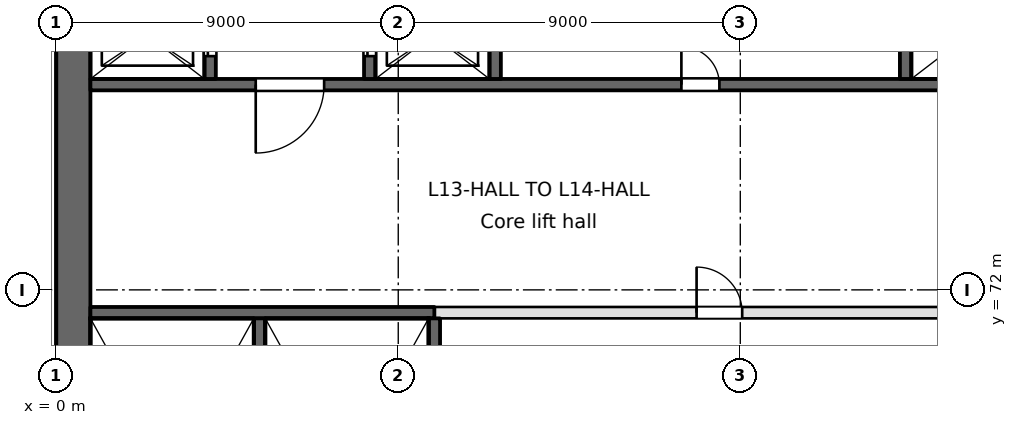
"""IFC4 building model, lengths in metres.
Left out: names, types, materials, properties, quantities, classifications, styles, units other than length and angle.
Written with IfcOpenShell. Run it as: python <this file> out.ifc"""

import sys

from ifc_helpers import new_model, si_unit, direction, frame, frame_2d, origin, place, context, subcontext, project, spatial, rectangle, extrude, element, fill, save


model = new_model("IFC4")
c1 = context("Model", 3, precision=1e-05, world=origin(), true_north=direction((0.0, 1.0)))
c2 = subcontext(c1, "Body", "Model", "MODEL_VIEW")
j1 = project(units=[si_unit("LENGTHUNIT", "METRE"), si_unit("PLANEANGLEUNIT", "RADIAN")], contexts=[c1])
p1 = place(None, origin())
s1 = spatial("IfcSite", under=j1, at=p1, CompositionType="ELEMENT")
p2 = place(p1, origin())
s2 = spatial("IfcBuilding", under=s1, at=p2, CompositionType="ELEMENT")
p3 = place(p2, frame((0.0, 0.0, 58.0)))
s3 = spatial("IfcBuildingStorey", under=s2, at=p3, CompositionType="ELEMENT", Elevation=58.0)
p4 = place(p3, frame((0.45, 94.5, 0.0), z_axis=(0.0, 0.0, 1.0), x_axis=(0.0, -1.0, 0.0)))
e1 = element("IfcWall", 1, at=p4, inside=s3, PredefinedType="SHEAR", context=c2, shape_type="SweptSolid", body=[
    extrude(rectangle(XDim=66.187, YDim=0.9, at=frame_2d((33.094, 0.0))), origin(), (0.0, 0.0, 1.0), 3.7),
])
p5 = place(p3, frame((0.9, 71.4, -0.4), z_axis=(0.0, 0.0, 1.0), x_axis=(1.0, 0.0, 0.0)))
e2 = element("IfcWall", 2, at=p5, inside=s3, PredefinedType="SOLIDWALL", context=c2, shape_type="SweptSolid", body=[
    extrude(rectangle(XDim=9.05, YDim=0.3, at=frame_2d((4.525, 0.0))), origin(), (0.0, 0.0, 1.0), 3.7),
])
p6 = place(p3, frame((9.95, 71.4, 0.0), z_axis=(0.0, 0.0, 1.0), x_axis=(1.0, 0.0, 0.0)))
e3 = element("IfcWall", 3, at=p6, inside=s3, PredefinedType="PARTITIONING", context=c2, shape_type="SweptSolid", body=[
    extrude(rectangle(XDim=17.65, YDim=0.3, at=frame_2d((8.825, 0.0))), origin(), (0.0, 0.0, 1.0), 3.3),
])
p7 = place(p6, frame((15.35, 0.0, 0.0)))
e4 = element("IfcOpeningElement", 4, at=p7, cuts=e3, PredefinedType="OPENING", context=c2, shape_type="SweptSolid", body=[
    extrude(rectangle(XDim=1.8, YDim=2.1, at=frame_2d((0.9, 1.05))), frame((0.0, 0.15, 0.0), z_axis=(0.0, -1.0, 0.0), x_axis=(1.0, 0.0, 0.0)), (0.0, 0.0, 1.0), 0.3),
])
p8 = place(p6, frame((6.9, 0.0, 0.0)))
e5 = element("IfcOpeningElement", 5, at=p8, cuts=e3, PredefinedType="OPENING", context=c2, shape_type="SweptSolid", body=[
    extrude(rectangle(XDim=1.2, YDim=2.1, at=frame_2d((0.6, 1.05))), frame((0.0, 0.15, 0.0), z_axis=(0.0, -1.0, 0.0), x_axis=(1.0, 0.0, 0.0)), (0.0, 0.0, 1.0), 0.3),
])
p9 = place(p3, frame((0.9, 77.4, -0.4), z_axis=(0.0, 0.0, 1.0), x_axis=(1.0, 0.0, 0.0)))
e6 = element("IfcWall", 6, at=p9, inside=s3, PredefinedType="SOLIDWALL", context=c2, shape_type="SweptSolid", body=[
    extrude(rectangle(XDim=28.95, YDim=0.3, at=frame_2d((14.475, 0.0))), origin(), (0.0, 0.0, 1.0), 3.7),
])
p10 = place(p9, frame((4.35, 0.0, 0.4)))
e7 = element("IfcOpeningElement", 7, at=p10, cuts=e6, PredefinedType="OPENING", context=c2, shape_type="SweptSolid", body=[
    extrude(rectangle(XDim=1.8, YDim=2.1, at=frame_2d((0.9, 1.05))), frame((0.0, 0.15, 0.0), z_axis=(0.0, -1.0, 0.0), x_axis=(1.0, 0.0, 0.0)), (0.0, 0.0, 1.0), 0.3),
])
p11 = place(p9, frame((25.95, 0.0, 0.4)))
e8 = element("IfcOpeningElement", 8, at=p11, cuts=e6, PredefinedType="OPENING", context=c2, shape_type="SweptSolid", body=[
    extrude(rectangle(XDim=1.8, YDim=2.1, at=frame_2d((0.9, 1.05))), frame((0.0, 0.15, 0.0), z_axis=(0.0, -1.0, 0.0), x_axis=(1.0, 0.0, 0.0)), (0.0, 0.0, 1.0), 0.3),
])
p12 = place(p9, frame((15.55, 0.0, 0.4)))
e9 = element("IfcOpeningElement", 9, at=p12, cuts=e6, PredefinedType="OPENING", context=c2, shape_type="SweptSolid", body=[
    extrude(rectangle(XDim=1.0, YDim=2.1, at=frame_2d((0.5, 1.05))), frame((0.0, 0.15, 0.0), z_axis=(0.0, -1.0, 0.0), x_axis=(1.0, 0.0, 0.0)), (0.0, 0.0, 1.0), 0.3),
])
p13 = place(p3, frame((4.05, 77.55, -0.4), z_axis=(0.0, 0.0, 1.0), x_axis=(0.0, 1.0, 0.0)))
e10 = element("IfcWall", 10, at=p13, inside=s3, PredefinedType="SOLIDWALL", context=c2, shape_type="SweptSolid", body=[
    extrude(rectangle(XDim=10.1, YDim=0.3, at=frame_2d((5.05, 0.0))), origin(), (0.0, 0.0, 1.0), 3.7),
])
p14 = place(p13, frame((0.6, 0.0, 0.4)))
e11 = element("IfcOpeningElement", 11, at=p14, cuts=e10, PredefinedType="OPENING", context=c2, shape_type="SweptSolid", body=[
    extrude(rectangle(XDim=1.1, YDim=2.1, at=frame_2d((0.55, 1.05))), frame((0.0, 0.15, 0.0), z_axis=(0.0, -1.0, 0.0), x_axis=(1.0, 0.0, 0.0)), (0.0, 0.0, 1.0), 0.3),
])
p15 = place(p13, frame((3.2, 0.0, 0.4)))
e12 = element("IfcOpeningElement", 12, at=p15, cuts=e10, PredefinedType="OPENING", context=c2, shape_type="SweptSolid", body=[
    extrude(rectangle(XDim=1.1, YDim=2.1, at=frame_2d((0.55, 1.05))), frame((0.0, 0.15, 0.0), z_axis=(0.0, -1.0, 0.0), x_axis=(1.0, 0.0, 0.0)), (0.0, 0.0, 1.0), 0.3),
])
p16 = place(p13, frame((5.8, 0.0, 0.4)))
e13 = element("IfcOpeningElement", 13, at=p16, cuts=e10, PredefinedType="OPENING", context=c2, shape_type="SweptSolid", body=[
    extrude(rectangle(XDim=1.1, YDim=2.1, at=frame_2d((0.55, 1.05))), frame((0.0, 0.15, 0.0), z_axis=(0.0, -1.0, 0.0), x_axis=(1.0, 0.0, 0.0)), (0.0, 0.0, 1.0), 0.3),
])
p17 = place(p13, frame((8.4, 0.0, 0.4)))
e14 = element("IfcOpeningElement", 14, at=p17, cuts=e10, PredefinedType="OPENING", context=c2, shape_type="SweptSolid", body=[
    extrude(rectangle(XDim=1.1, YDim=2.1, at=frame_2d((0.55, 1.05))), frame((0.0, 0.15, 0.0), z_axis=(0.0, -1.0, 0.0), x_axis=(1.0, 0.0, 0.0)), (0.0, 0.0, 1.0), 0.3),
])
p18 = place(p3, frame((5.35, 63.5, -0.4), z_axis=(0.0, 0.0, 1.0), x_axis=(0.0, 1.0, 0.0)))
e15 = element("IfcWall", 15, at=p18, inside=s3, PredefinedType="SOLIDWALL", context=c2, shape_type="SweptSolid", body=[
    extrude(rectangle(XDim=7.75, YDim=0.3, at=frame_2d((3.875, 0.0))), origin(), (0.0, 0.0, 1.0), 3.7),
])
p19 = place(p3, frame((8.25, 77.55, -0.4), z_axis=(0.0, 0.0, 1.0), x_axis=(0.0, 1.0, 0.0)))
e16 = element("IfcWall", 16, at=p19, inside=s3, PredefinedType="SOLIDWALL", context=c2, shape_type="SweptSolid", body=[
    extrude(rectangle(XDim=10.1, YDim=0.3, at=frame_2d((5.05, 0.0))), origin(), (0.0, 0.0, 1.0), 3.7),
])
p20 = place(p19, frame((0.6, 0.0, 0.4)))
e17 = element("IfcOpeningElement", 17, at=p20, cuts=e16, PredefinedType="OPENING", context=c2, shape_type="SweptSolid", body=[
    extrude(rectangle(XDim=1.1, YDim=2.1, at=frame_2d((0.55, 1.05))), frame((0.0, 0.15, 0.0), z_axis=(0.0, -1.0, 0.0), x_axis=(1.0, 0.0, 0.0)), (0.0, 0.0, 1.0), 0.3),
])
p21 = place(p19, frame((3.2, 0.0, 0.4)))
e18 = element("IfcOpeningElement", 18, at=p21, cuts=e16, PredefinedType="OPENING", context=c2, shape_type="SweptSolid", body=[
    extrude(rectangle(XDim=1.1, YDim=2.1, at=frame_2d((0.55, 1.05))), frame((0.0, 0.15, 0.0), z_axis=(0.0, -1.0, 0.0), x_axis=(1.0, 0.0, 0.0)), (0.0, 0.0, 1.0), 0.3),
])
p22 = place(p19, frame((5.8, 0.0, 0.4)))
e19 = element("IfcOpeningElement", 19, at=p22, cuts=e16, PredefinedType="OPENING", context=c2, shape_type="SweptSolid", body=[
    extrude(rectangle(XDim=1.1, YDim=2.1, at=frame_2d((0.55, 1.05))), frame((0.0, 0.15, 0.0), z_axis=(0.0, -1.0, 0.0), x_axis=(1.0, 0.0, 0.0)), (0.0, 0.0, 1.0), 0.3),
])
p23 = place(p19, frame((8.4, 0.0, 0.4)))
e20 = element("IfcOpeningElement", 20, at=p23, cuts=e16, PredefinedType="OPENING", context=c2, shape_type="SweptSolid", body=[
    extrude(rectangle(XDim=1.1, YDim=2.1, at=frame_2d((0.55, 1.05))), frame((0.0, 0.15, 0.0), z_axis=(0.0, -1.0, 0.0), x_axis=(1.0, 0.0, 0.0)), (0.0, 0.0, 1.0), 0.3),
])
p24 = place(p3, frame((9.95, 63.5, -0.4), z_axis=(0.0, 0.0, 1.0), x_axis=(0.0, 1.0, 0.0)))
e21 = element("IfcWall", 21, at=p24, inside=s3, PredefinedType="SOLIDWALL", context=c2, shape_type="SweptSolid", body=[
    extrude(rectangle(XDim=7.75, YDim=0.3, at=frame_2d((3.875, 0.0))), origin(), (0.0, 0.0, 1.0), 3.7),
])
for number, where, z_axis, x_axis in (
    (22, (11.55, 77.55, -0.4), (0.0, 0.0, 1.0), (0.0, 1.0, 0.0)),
    (23, (22.35, 77.55, -0.4), (0.0, 0.0, 1.0), (0.0, 1.0, 0.0)),
):
    element("IfcWall", number, at=place(p3, frame(where, z_axis=z_axis, x_axis=x_axis)), inside=s3, PredefinedType="SOLIDWALL", context=c2, shape_type="SweptSolid", body=[
        extrude(rectangle(XDim=10.1, YDim=0.3, at=frame_2d((5.05, 0.0))), origin(), (0.0, 0.0, 1.0), 3.7),
    ])
p25 = place(p14, origin())
e24 = element("IfcDoor", 24, at=p25, inside=s3, OperationType="SLIDING_TO_RIGHT", PredefinedType="DOOR", context=c2, shape_type="SweptSolid", body=[
    extrude(rectangle(XDim=1.1, YDim=2.1, at=frame_2d((0.55, 1.05))), frame((0.0, 0.025, 0.0), z_axis=(0.0, -1.0, 0.0), x_axis=(1.0, 0.0, 0.0)), (0.0, 0.0, 1.0), 0.05),
])
fill(e11, e24)
p26 = place(p20, origin())
e25 = element("IfcDoor", 25, at=p26, inside=s3, OperationType="SLIDING_TO_RIGHT", PredefinedType="DOOR", context=c2, shape_type="SweptSolid", body=[
    extrude(rectangle(XDim=1.1, YDim=2.1, at=frame_2d((0.55, 1.05))), frame((0.0, 0.025, 0.0), z_axis=(0.0, -1.0, 0.0), x_axis=(1.0, 0.0, 0.0)), (0.0, 0.0, 1.0), 0.05),
])
fill(e17, e25)
p27 = place(p10, frame((1.8, 0.0, 0.0), z_axis=(0.0, 0.0, 1.0), x_axis=(-1.0, 0.0, 0.0)))
e26 = element("IfcDoor", 26, at=p27, inside=s3, OperationType="SINGLE_SWING_RIGHT", PredefinedType="DOOR", context=c2, shape_type="SweptSolid", body=[
    extrude(rectangle(XDim=1.8, YDim=2.1, at=frame_2d((0.9, 1.05))), frame((0.0, 0.025, 0.0), z_axis=(0.0, -1.0, 0.0), x_axis=(1.0, 0.0, 0.0)), (0.0, 0.0, 1.0), 0.05),
])
fill(e7, e26)
p28 = place(p8, origin())
e27 = element("IfcDoor", 27, at=p28, inside=s3, OperationType="SINGLE_SWING_LEFT", PredefinedType="DOOR", context=c2, shape_type="SweptSolid", body=[
    extrude(rectangle(XDim=1.2, YDim=2.1, at=frame_2d((0.6, 1.05))), frame((0.0, 0.025, 0.0), z_axis=(0.0, -1.0, 0.0), x_axis=(1.0, 0.0, 0.0)), (0.0, 0.0, 1.0), 0.05),
])
fill(e5, e27)
p29 = place(p12, origin())
e28 = element("IfcDoor", 28, at=p29, inside=s3, OperationType="SINGLE_SWING_LEFT", PredefinedType="DOOR", context=c2, shape_type="SweptSolid", body=[
    extrude(rectangle(XDim=1.0, YDim=2.1, at=frame_2d((0.5, 1.05))), frame((0.0, 0.025, 0.0), z_axis=(0.0, -1.0, 0.0), x_axis=(1.0, 0.0, 0.0)), (0.0, 0.0, 1.0), 0.05),
])
fill(e9, e28)
save(model, sys.argv[1])
